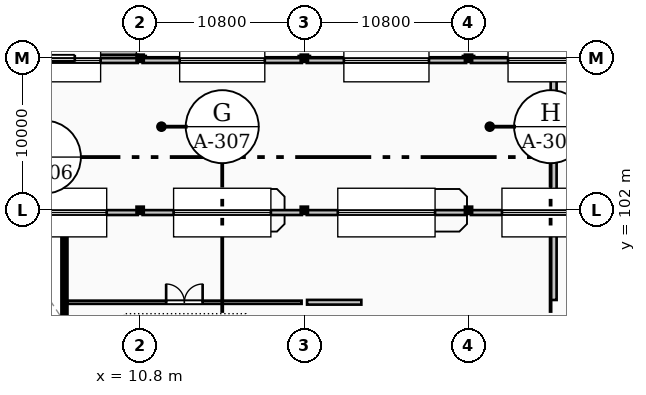
"""IFC4 building model, lengths in metres.
Left out: names, types, materials, properties, quantities, classifications, styles, units other than length and angle.
Written with IfcOpenShell. Run it as: python <this file> out.ifc"""

import sys

from ifc_helpers import new_model, si_unit, direction, frame, frame_2d, origin, origin_2d, place, context, subcontext, project, spatial, rectangle, i_section, extrude, element, fill, save


model = new_model("IFC4")
c1 = context("Model", 3, precision=1e-05, world=origin(), true_north=direction((0.0, 1.0)))
c2 = subcontext(c1, "Body", "Model", "MODEL_VIEW")
j1 = project(units=[si_unit("LENGTHUNIT", "METRE"), si_unit("PLANEANGLEUNIT", "RADIAN")], contexts=[c1])
p1 = place(None, origin())
s1 = spatial("IfcSite", under=j1, at=p1, CompositionType="ELEMENT")
p2 = place(p1, origin())
s2 = spatial("IfcBuilding", under=s1, at=p2, CompositionType="ELEMENT")
p3 = place(p2, frame((0.0, 0.0, 28.8)))
s3 = spatial("IfcBuildingStorey", under=s2, at=p3, CompositionType="ELEMENT", Elevation=28.8)
for number, where, z_axis, x_axis in (
    (1, (10.8, 102.0, 0.0), (0.0, 0.0, 1.0), (1.0, 0.0, 0.0)),
    (2, (10.8, 112.0, 0.0), (0.0, 0.0, 1.0), (1.0, 0.0, 0.0)),
    (3, (21.6, 102.0, 0.0), (0.0, 0.0, 1.0), (1.0, 0.0, 0.0)),
    (4, (21.6, 112.0, 0.0), (0.0, 0.0, 1.0), (1.0, 0.0, 0.0)),
    (5, (32.4, 102.0, 0.0), (0.0, 0.0, 1.0), (1.0, 0.0, 0.0)),
    (6, (32.4, 112.0, 0.0), (0.0, 0.0, 1.0), (1.0, 0.0, 0.0)),
):
    element("IfcColumn", number, at=place(p3, frame(where, z_axis=z_axis, x_axis=x_axis)), inside=s3, PredefinedType="COLUMN", context=c2, shape_type="SweptSolid", body=[
        extrude(i_section(OverallWidth=0.3, OverallDepth=0.3, WebThickness=0.011, FlangeThickness=0.019, FilletRadius=0.027, at=origin_2d()), origin(), (0.0, 0.0, 1.0), 5.4),
    ])
p4 = place(p3, frame((38.45, 112.0, 0.0), z_axis=(0.0, 0.0, 1.0), x_axis=(-1.0, 0.0, 0.0)))
e7 = element("IfcWall", 7, at=p4, inside=s3, PredefinedType="STANDARD", context=c2, shape_type="SweptSolid", body=[
    extrude(rectangle(XDim=1.3, YDim=0.48, at=frame_2d((0.65, 0.0))), origin(), (0.0, 0.0, 1.0), 5.044),
])
p5 = place(p3, frame((32.77, 112.0, 0.0), z_axis=(0.0, 0.0, 1.0), x_axis=(-1.0, 0.0, 0.0)))
e8 = element("IfcWall", 8, at=p5, inside=s3, PredefinedType="STANDARD", context=c2, shape_type="SweptSolid", body=[
    extrude(rectangle(XDim=0.225, YDim=0.3, at=frame_2d((0.113, 0.0))), origin(), (0.0, 0.0, 1.0), 5.16),
])
p6 = place(p3, frame((27.65, 112.0, 0.0), z_axis=(0.0, 0.0, 1.0), x_axis=(-1.0, 0.0, 0.0)))
e9 = element("IfcWall", 9, at=p6, inside=s3, PredefinedType="STANDARD", context=c2, shape_type="SweptSolid", body=[
    extrude(rectangle(XDim=1.3, YDim=0.48, at=frame_2d((0.65, 0.0))), origin(), (0.0, 0.0, 1.0), 5.044),
])
for number, where, z_axis, x_axis in (
    (10, (32.255, 112.0, 0.0), (0.0, 0.0, 1.0), (-1.0, 0.0, 0.0)),
    (11, (21.97, 112.0, 0.0), (0.0, 0.0, 1.0), (-1.0, 0.0, 0.0)),
):
    element("IfcWall", number, at=place(p3, frame(where, z_axis=z_axis, x_axis=x_axis)), inside=s3, PredefinedType="STANDARD", context=c2, shape_type="SweptSolid", body=[
        extrude(rectangle(XDim=0.225, YDim=0.3, at=frame_2d((0.112, 0.0))), origin(), (0.0, 0.0, 1.0), 5.16),
    ])
p7 = place(p3, frame((16.85, 112.0, 0.0), z_axis=(0.0, 0.0, 1.0), x_axis=(-1.0, 0.0, 0.0)))
e12 = element("IfcWall", 12, at=p7, inside=s3, PredefinedType="STANDARD", context=c2, shape_type="SweptSolid", body=[
    extrude(rectangle(XDim=1.3, YDim=0.48, at=frame_2d((0.65, 0.0))), origin(), (0.0, 0.0, 1.0), 5.044),
])
p8 = place(p3, frame((21.455, 112.0, 0.0), z_axis=(0.0, 0.0, 1.0), x_axis=(-1.0, 0.0, 0.0)))
e13 = element("IfcWall", 13, at=p8, inside=s3, PredefinedType="STANDARD", context=c2, shape_type="SweptSolid", body=[
    extrude(rectangle(XDim=0.225, YDim=0.3, at=frame_2d((0.113, 0.0))), origin(), (0.0, 0.0, 1.0), 5.16),
])
p9 = place(p3, frame((11.17, 112.0, 0.0), z_axis=(0.0, 0.0, 1.0), x_axis=(-1.0, 0.0, 0.0)))
e14 = element("IfcWall", 14, at=p9, inside=s3, PredefinedType="STANDARD", context=c2, shape_type="SweptSolid", body=[
    extrude(rectangle(XDim=0.225, YDim=0.3, at=frame_2d((0.112, 0.0))), origin(), (0.0, 0.0, 1.0), 5.16),
])
p10 = place(p3, frame((10.655, 112.0, 0.0), z_axis=(0.0, 0.0, 1.0), x_axis=(-1.0, 0.0, 0.0)))
e15 = element("IfcWall", 15, at=p10, inside=s3, PredefinedType="STANDARD", context=c2, shape_type="SweptSolid", body=[
    extrude(rectangle(XDim=10.51, YDim=0.45, at=frame_2d((5.255, 0.0))), origin(), (0.0, 0.0, 1.0), 5.044),
])
p11 = place(p10, frame((4.155, 0.0, 1.0)))
e16 = element("IfcOpeningElement", 16, at=p11, cuts=e15, PredefinedType="OPENING", context=c2, shape_type="SweptSolid", body=[
    extrude(rectangle(XDim=2.2, YDim=3.0, at=frame_2d((1.1, 1.5))), frame((0.0, 0.235, 0.0), z_axis=(0.0, -1.0, 0.0), x_axis=(1.0, 0.0, 0.0)), (0.0, 0.0, 1.0), 0.47),
])
p12 = place(p3, frame((0.16, 101.85, 5.4), z_axis=(0.0, 0.0, 1.0), x_axis=(1.0, 0.0, 0.0)))
e17 = element("IfcWall", 17, at=p12, inside=s3, PredefinedType="STANDARD", context=c2, shape_type="SweptSolid", body=[
    extrude(rectangle(XDim=10.48, YDim=0.32, at=frame_2d((5.24, 0.0))), origin(), (0.0, 0.0, 1.0), 2.45),
])
p13 = place(p12, frame((2.04, 0.0, 0.45)))
e18 = element("IfcOpeningElement", 18, at=p13, cuts=e17, PredefinedType="OPENING", context=c2, shape_type="SweptSolid", body=[
    extrude(rectangle(XDim=6.4, YDim=1.5, at=frame_2d((3.2, 0.75))), frame((0.0, 0.17, 0.0), z_axis=(0.0, -1.0, 0.0), x_axis=(1.0, 0.0, 0.0)), (0.0, 0.0, 1.0), 0.34),
])
p14 = place(p3, frame((10.96, 101.85, 5.4), z_axis=(0.0, 0.0, 1.0), x_axis=(1.0, 0.0, 0.0)))
e19 = element("IfcWall", 19, at=p14, inside=s3, PredefinedType="STANDARD", context=c2, shape_type="SweptSolid", body=[
    extrude(rectangle(XDim=10.48, YDim=0.32, at=frame_2d((5.24, 0.0))), origin(), (0.0, 0.0, 1.0), 2.45),
])
p15 = place(p14, frame((2.04, 0.0, 0.45)))
e20 = element("IfcOpeningElement", 20, at=p15, cuts=e19, PredefinedType="OPENING", context=c2, shape_type="SweptSolid", body=[
    extrude(rectangle(XDim=6.4, YDim=1.5, at=frame_2d((3.2, 0.75))), frame((0.0, 0.17, 0.0), z_axis=(0.0, -1.0, 0.0), x_axis=(1.0, 0.0, 0.0)), (0.0, 0.0, 1.0), 0.34),
])
p16 = place(p3, frame((21.76, 101.85, 5.4), z_axis=(0.0, 0.0, 1.0), x_axis=(1.0, 0.0, 0.0)))
e21 = element("IfcWall", 21, at=p16, inside=s3, PredefinedType="STANDARD", context=c2, shape_type="SweptSolid", body=[
    extrude(rectangle(XDim=10.48, YDim=0.32, at=frame_2d((5.24, 0.0))), origin(), (0.0, 0.0, 1.0), 2.45),
])
p17 = place(p16, frame((2.04, 0.0, 0.45)))
e22 = element("IfcOpeningElement", 22, at=p17, cuts=e21, PredefinedType="OPENING", context=c2, shape_type="SweptSolid", body=[
    extrude(rectangle(XDim=6.4, YDim=1.5, at=frame_2d((3.2, 0.75))), frame((0.0, 0.17, 0.0), z_axis=(0.0, -1.0, 0.0), x_axis=(1.0, 0.0, 0.0)), (0.0, 0.0, 1.0), 0.34),
])
p18 = place(p3, frame((32.56, 101.85, 5.4), z_axis=(0.0, 0.0, 1.0), x_axis=(1.0, 0.0, 0.0)))
e23 = element("IfcWall", 23, at=p18, inside=s3, PredefinedType="STANDARD", context=c2, shape_type="SweptSolid", body=[
    extrude(rectangle(XDim=10.48, YDim=0.32, at=frame_2d((5.24, 0.0))), origin(), (0.0, 0.0, 1.0), 2.45),
])
p19 = place(p18, frame((2.04, 0.0, 0.45)))
e24 = element("IfcOpeningElement", 24, at=p19, cuts=e23, PredefinedType="OPENING", context=c2, shape_type="SweptSolid", body=[
    extrude(rectangle(XDim=6.4, YDim=1.5, at=frame_2d((3.2, 0.75))), frame((0.0, 0.17, 0.0), z_axis=(0.0, -1.0, 0.0), x_axis=(1.0, 0.0, 0.0)), (0.0, 0.0, 1.0), 0.34),
])
p20 = place(p3, frame((0.16, 111.85, 5.4), z_axis=(0.0, 0.0, 1.0), x_axis=(1.0, 0.0, 0.0)))
e25 = element("IfcWall", 25, at=p20, inside=s3, PredefinedType="STANDARD", context=c2, shape_type="SweptSolid", body=[
    extrude(rectangle(XDim=10.48, YDim=0.32, at=frame_2d((5.24, 0.0))), origin(), (0.0, 0.0, 1.0), 2.45),
])
p21 = place(p20, frame((2.44, 0.0, 0.45)))
e26 = element("IfcOpeningElement", 26, at=p21, cuts=e25, PredefinedType="OPENING", context=c2, shape_type="SweptSolid", body=[
    extrude(rectangle(XDim=5.6, YDim=1.4, at=frame_2d((2.8, 0.7))), frame((0.0, 0.17, 0.0), z_axis=(0.0, -1.0, 0.0), x_axis=(1.0, 0.0, 0.0)), (0.0, 0.0, 1.0), 0.34),
])
p22 = place(p3, frame((10.96, 111.85, 5.4), z_axis=(0.0, 0.0, 1.0), x_axis=(1.0, 0.0, 0.0)))
e27 = element("IfcWall", 27, at=p22, inside=s3, PredefinedType="STANDARD", context=c2, shape_type="SweptSolid", body=[
    extrude(rectangle(XDim=10.48, YDim=0.32, at=frame_2d((5.24, 0.0))), origin(), (0.0, 0.0, 1.0), 2.45),
])
p23 = place(p22, frame((2.44, 0.0, 0.45)))
e28 = element("IfcOpeningElement", 28, at=p23, cuts=e27, PredefinedType="OPENING", context=c2, shape_type="SweptSolid", body=[
    extrude(rectangle(XDim=5.6, YDim=1.4, at=frame_2d((2.8, 0.7))), frame((0.0, 0.17, 0.0), z_axis=(0.0, -1.0, 0.0), x_axis=(1.0, 0.0, 0.0)), (0.0, 0.0, 1.0), 0.34),
])
p24 = place(p3, frame((21.76, 111.85, 5.4), z_axis=(0.0, 0.0, 1.0), x_axis=(1.0, 0.0, 0.0)))
e29 = element("IfcWall", 29, at=p24, inside=s3, PredefinedType="STANDARD", context=c2, shape_type="SweptSolid", body=[
    extrude(rectangle(XDim=10.48, YDim=0.32, at=frame_2d((5.24, 0.0))), origin(), (0.0, 0.0, 1.0), 2.45),
])
p25 = place(p24, frame((2.44, 0.0, 0.45)))
e30 = element("IfcOpeningElement", 30, at=p25, cuts=e29, PredefinedType="OPENING", context=c2, shape_type="SweptSolid", body=[
    extrude(rectangle(XDim=5.6, YDim=1.4, at=frame_2d((2.8, 0.7))), frame((0.0, 0.17, 0.0), z_axis=(0.0, -1.0, 0.0), x_axis=(1.0, 0.0, 0.0)), (0.0, 0.0, 1.0), 0.34),
])
p26 = place(p3, frame((32.56, 111.85, 5.4), z_axis=(0.0, 0.0, 1.0), x_axis=(1.0, 0.0, 0.0)))
e31 = element("IfcWall", 31, at=p26, inside=s3, PredefinedType="STANDARD", context=c2, shape_type="SweptSolid", body=[
    extrude(rectangle(XDim=10.48, YDim=0.32, at=frame_2d((5.24, 0.0))), origin(), (0.0, 0.0, 1.0), 2.45),
])
p27 = place(p26, frame((2.44, 0.0, 0.45)))
e32 = element("IfcOpeningElement", 32, at=p27, cuts=e31, PredefinedType="OPENING", context=c2, shape_type="SweptSolid", body=[
    extrude(rectangle(XDim=5.6, YDim=1.4, at=frame_2d((2.8, 0.7))), frame((0.0, 0.17, 0.0), z_axis=(0.0, -1.0, 0.0), x_axis=(1.0, 0.0, 0.0)), (0.0, 0.0, 1.0), 0.34),
])
p28 = place(p3, frame((5.82, 92.53, 0.0), z_axis=(0.0, 0.0, 1.0), x_axis=(0.0, 1.0, 0.0)))
e33 = element("IfcWall", 33, at=p28, inside=s3, PredefinedType="SHEAR", context=c2, shape_type="SweptSolid", body=[
    extrude(rectangle(XDim=9.14, YDim=0.22, at=frame_2d((4.57, 0.0))), origin(), (0.0, 0.0, 1.0), 5.16),
])
p29 = place(p3, frame((1.3, 101.67, 0.0), z_axis=(0.0, 0.0, 1.0), x_axis=(1.0, 0.0, 0.0)))
e34 = element("IfcWall", 34, at=p29, inside=s3, PredefinedType="SHEAR", context=c2, shape_type="SweptSolid", body=[
    extrude(rectangle(XDim=4.4, YDim=0.22, at=frame_2d((2.2, 0.0))), origin(), (0.0, 0.0, 1.0), 5.16),
])
p30 = place(p3, frame((6.0, 95.95, 0.0), z_axis=(0.0, 0.0, 1.0), x_axis=(1.0, 0.0, 0.0)))
e35 = element("IfcWall", 35, at=p30, inside=s3, PredefinedType="PARTITIONING", context=c2, shape_type="SweptSolid", body=[
    extrude(rectangle(XDim=15.42, YDim=0.21, at=frame_2d((7.71, 0.0))), origin(), (0.0, 0.0, 1.0), 5.12),
])
p31 = place(p30, frame((6.51, 0.0, 0.0)))
e36 = element("IfcOpeningElement", 36, at=p31, cuts=e35, PredefinedType="OPENING", context=c2, shape_type="SweptSolid", body=[
    extrude(rectangle(XDim=2.4, YDim=2.8, at=frame_2d((1.2, 1.4))), frame((0.0, 0.115, 0.0), z_axis=(0.0, -1.0, 0.0), x_axis=(1.0, 0.0, 0.0)), (0.0, 0.0, 1.0), 0.23),
])
p32 = place(p3, frame((21.78, 95.95, 0.0), z_axis=(0.0, 0.0, 1.0), x_axis=(1.0, 0.0, 0.0)))
e37 = element("IfcWall", 37, at=p32, inside=s3, PredefinedType="PARTITIONING", context=c2, shape_type="SweptSolid", body=[
    extrude(rectangle(XDim=3.57, YDim=0.31, at=frame_2d((1.785, 0.0))), origin(), (0.0, 0.0, 1.0), 5.12),
])
p33 = place(p3, frame((38.0, 96.1, 0.0), z_axis=(0.0, 0.0, 1.0), x_axis=(0.0, 1.0, 0.0)))
e38 = element("IfcWall", 38, at=p33, inside=s3, PredefinedType="PARTITIONING", context=c2, shape_type="SweptSolid", body=[
    extrude(rectangle(XDim=15.72, YDim=0.39, at=frame_2d((7.86, 0.0))), origin(), (0.0, 0.0, 1.0), 5.12),
])
p34 = place(p11, origin())
e39 = element("IfcWindow", 39, at=p34, inside=s3, PartitioningType="SINGLE_PANEL", PredefinedType="WINDOW", context=c2, shape_type="SweptSolid", body=[
    extrude(rectangle(XDim=2.2, YDim=3.0, at=frame_2d((1.1, 1.5))), frame((0.0, 0.03, 0.0), z_axis=(0.0, -1.0, 0.0), x_axis=(1.0, 0.0, 0.0)), (0.0, 0.0, 1.0), 0.06),
])
fill(e16, e39)
p35 = place(p13, origin())
e40 = element("IfcWindow", 40, at=p35, inside=s3, PartitioningType="SINGLE_PANEL", PredefinedType="SKYLIGHT", context=c2, shape_type="SweptSolid", body=[
    extrude(rectangle(XDim=6.4, YDim=1.5, at=frame_2d((3.2, 0.75))), frame((0.0, 0.03, 0.0), z_axis=(0.0, -1.0, 0.0), x_axis=(1.0, 0.0, 0.0)), (0.0, 0.0, 1.0), 0.06),
])
fill(e18, e40)
p36 = place(p15, origin())
e41 = element("IfcWindow", 41, at=p36, inside=s3, PartitioningType="SINGLE_PANEL", PredefinedType="SKYLIGHT", context=c2, shape_type="SweptSolid", body=[
    extrude(rectangle(XDim=6.4, YDim=1.5, at=frame_2d((3.2, 0.75))), frame((0.0, 0.03, 0.0), z_axis=(0.0, -1.0, 0.0), x_axis=(1.0, 0.0, 0.0)), (0.0, 0.0, 1.0), 0.06),
])
fill(e20, e41)
p37 = place(p17, origin())
e42 = element("IfcWindow", 42, at=p37, inside=s3, PartitioningType="SINGLE_PANEL", PredefinedType="SKYLIGHT", context=c2, shape_type="SweptSolid", body=[
    extrude(rectangle(XDim=6.4, YDim=1.5, at=frame_2d((3.2, 0.75))), frame((0.0, 0.03, 0.0), z_axis=(0.0, -1.0, 0.0), x_axis=(1.0, 0.0, 0.0)), (0.0, 0.0, 1.0), 0.06),
])
fill(e22, e42)
p38 = place(p19, origin())
e43 = element("IfcWindow", 43, at=p38, inside=s3, PartitioningType="SINGLE_PANEL", PredefinedType="SKYLIGHT", context=c2, shape_type="SweptSolid", body=[
    extrude(rectangle(XDim=6.4, YDim=1.5, at=frame_2d((3.2, 0.75))), frame((0.0, 0.03, 0.0), z_axis=(0.0, -1.0, 0.0), x_axis=(1.0, 0.0, 0.0)), (0.0, 0.0, 1.0), 0.06),
])
fill(e24, e43)
p39 = place(p21, origin())
e44 = element("IfcWindow", 44, at=p39, inside=s3, PartitioningType="SINGLE_PANEL", PredefinedType="SKYLIGHT", context=c2, shape_type="SweptSolid", body=[
    extrude(rectangle(XDim=5.6, YDim=1.4, at=frame_2d((2.8, 0.7))), frame((0.0, 0.03, 0.0), z_axis=(0.0, -1.0, 0.0), x_axis=(1.0, 0.0, 0.0)), (0.0, 0.0, 1.0), 0.06),
])
fill(e26, e44)
p40 = place(p23, origin())
e45 = element("IfcWindow", 45, at=p40, inside=s3, PartitioningType="SINGLE_PANEL", PredefinedType="SKYLIGHT", context=c2, shape_type="SweptSolid", body=[
    extrude(rectangle(XDim=5.6, YDim=1.4, at=frame_2d((2.8, 0.7))), frame((0.0, 0.03, 0.0), z_axis=(0.0, -1.0, 0.0), x_axis=(1.0, 0.0, 0.0)), (0.0, 0.0, 1.0), 0.06),
])
fill(e28, e45)
p41 = place(p25, origin())
e46 = element("IfcWindow", 46, at=p41, inside=s3, PartitioningType="SINGLE_PANEL", PredefinedType="SKYLIGHT", context=c2, shape_type="SweptSolid", body=[
    extrude(rectangle(XDim=5.6, YDim=1.4, at=frame_2d((2.8, 0.7))), frame((0.0, 0.03, 0.0), z_axis=(0.0, -1.0, 0.0), x_axis=(1.0, 0.0, 0.0)), (0.0, 0.0, 1.0), 0.06),
])
fill(e30, e46)
p42 = place(p27, origin())
e47 = element("IfcWindow", 47, at=p42, inside=s3, PartitioningType="SINGLE_PANEL", PredefinedType="SKYLIGHT", context=c2, shape_type="SweptSolid", body=[
    extrude(rectangle(XDim=5.6, YDim=1.4, at=frame_2d((2.8, 0.7))), frame((0.0, 0.03, 0.0), z_axis=(0.0, -1.0, 0.0), x_axis=(1.0, 0.0, 0.0)), (0.0, 0.0, 1.0), 0.06),
])
fill(e32, e47)
p43 = place(p31, origin())
e48 = element("IfcDoor", 48, at=p43, inside=s3, OperationType="DOUBLE_DOOR_SINGLE_SWING", PredefinedType="DOOR", context=c2, shape_type="SweptSolid", body=[
    extrude(rectangle(XDim=2.4, YDim=2.8, at=frame_2d((1.2, 1.4))), frame((0.0, 0.025, 0.0), z_axis=(0.0, -1.0, 0.0), x_axis=(1.0, 0.0, 0.0)), (0.0, 0.0, 1.0), 0.05),
])
fill(e36, e48)
save(model, sys.argv[1])
